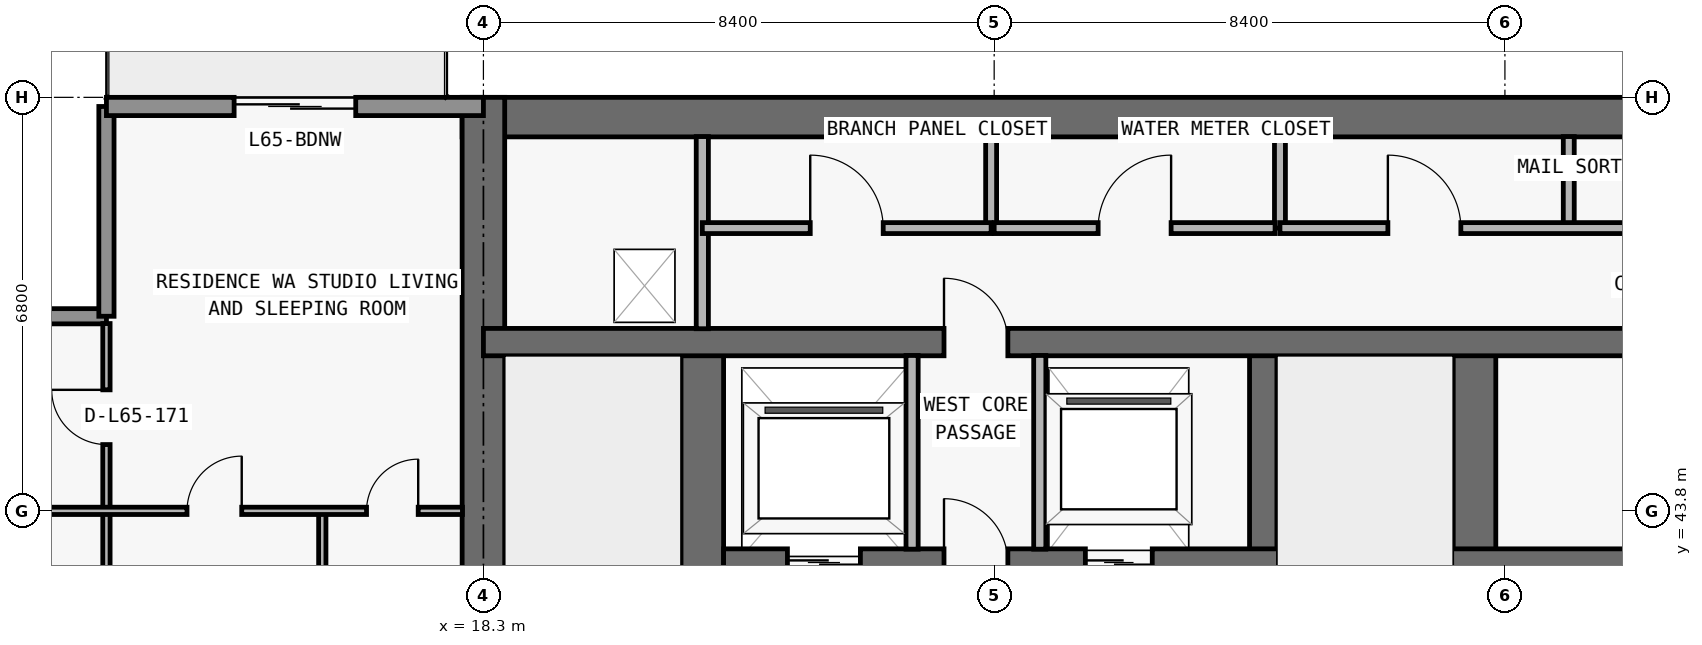
"""IFC4 building model, lengths in metres.
Left out: names, types, materials, properties, quantities, classifications, styles, units other than length and angle.
Written with IfcOpenShell. Run it as: python <this file> out.ifc"""

import sys

from ifc_helpers import new_model, si_unit, direction, frame, frame_2d, origin, place, context, subcontext, project, spatial, rectangle, extrude, element, fill, save


model = new_model("IFC4")
c1 = context("Model", 3, precision=1e-05, world=origin(), true_north=direction((0.0, 1.0)))
c2 = subcontext(c1, "Body", "Model", "MODEL_VIEW")
j1 = project(units=[si_unit("LENGTHUNIT", "METRE"), si_unit("PLANEANGLEUNIT", "RADIAN")], contexts=[c1])
p1 = place(None, origin())
s1 = spatial("IfcSite", under=j1, at=p1, CompositionType="ELEMENT")
p2 = place(p1, origin())
s2 = spatial("IfcBuilding", under=s1, at=p2, CompositionType="ELEMENT")
p3 = place(p2, frame((0.0, 0.0, 233.1)))
s3 = spatial("IfcBuildingStorey", under=s2, at=p3, CompositionType="ELEMENT", Elevation=233.1)
p4 = place(p3, frame((17.95, 50.275, 0.0), z_axis=(0.0, 0.0, 1.0), x_axis=(1.0, 0.0, 0.0)))
e1 = element("IfcWall", 1, at=p4, inside=s3, PredefinedType="SHEAR", context=c2, shape_type="SweptSolid", body=[
    extrude(rectangle(XDim=41.9, YDim=0.65, at=frame_2d((20.95, 0.0))), origin(), (0.0, 0.0, 1.0), 3.05),
])
p5 = place(p3, frame((18.3, 36.65, 0.0), z_axis=(0.0, 0.0, 1.0), x_axis=(0.0, 1.0, 0.0)))
e2 = element("IfcWall", 2, at=p5, inside=s3, PredefinedType="SHEAR", context=c2, shape_type="SweptSolid", body=[
    extrude(rectangle(XDim=13.95, YDim=0.7, at=frame_2d((6.975, 0.0))), origin(), (0.0, 0.0, 1.0), 3.05),
])
p6 = place(p3, frame((21.9, 37.0, 0.0), z_axis=(0.0, 0.0, 1.0), x_axis=(0.0, 1.0, 0.0)))
e3 = element("IfcWall", 3, at=p6, inside=s3, PredefinedType="SHEAR", context=c2, shape_type="SweptSolid", body=[
    extrude(rectangle(XDim=9.575, YDim=0.7, at=frame_2d((4.788, 0.0))), origin(), (0.0, 0.0, 1.0), 3.05),
])
p7 = place(p6, frame((0.55, 0.0, 0.0)))
e4 = element("IfcOpeningElement", 4, at=p7, cuts=e3, PredefinedType="OPENING", context=c2, shape_type="SweptSolid", body=[
    extrude(rectangle(XDim=1.1, YDim=2.15, at=frame_2d((0.55, 1.075))), frame((0.0, 0.36, 0.0), z_axis=(0.0, -1.0, 0.0), x_axis=(1.0, 0.0, 0.0)), (0.0, 0.0, 1.0), 0.72),
])
p8 = place(p3, frame((31.125, 37.0, 0.0), z_axis=(0.0, 0.0, 1.0), x_axis=(0.0, 1.0, 0.0)))
e5 = element("IfcWall", 5, at=p8, inside=s3, PredefinedType="SHEAR", context=c2, shape_type="SweptSolid", body=[
    extrude(rectangle(XDim=9.575, YDim=0.45, at=frame_2d((4.788, 0.0))), origin(), (0.0, 0.0, 1.0), 3.05),
])
p9 = place(p3, frame((34.6, 37.0, 0.0), z_axis=(0.0, 0.0, 1.0), x_axis=(0.0, 1.0, 0.0)))
e6 = element("IfcWall", 6, at=p9, inside=s3, PredefinedType="SHEAR", context=c2, shape_type="SweptSolid", body=[
    extrude(rectangle(XDim=9.575, YDim=0.7, at=frame_2d((4.788, 0.0))), origin(), (0.0, 0.0, 1.0), 3.05),
])
p10 = place(p3, frame((22.25, 42.95, 0.0), z_axis=(0.0, 0.0, 1.0), x_axis=(1.0, 0.0, 0.0)))
e7 = element("IfcWall", 7, at=p10, inside=s3, PredefinedType="SHEAR", context=c2, shape_type="SweptSolid", body=[
    extrude(rectangle(XDim=33.3, YDim=0.45, at=frame_2d((16.65, 0.0))), origin(), (0.0, 0.0, 1.0), 3.05),
])
p11 = place(p10, frame((1.05, 0.0, 0.0)))
e8 = element("IfcOpeningElement", 8, at=p11, cuts=e7, PredefinedType="OPENING", context=c2, shape_type="SweptSolid", body=[
    extrude(rectangle(XDim=1.2, YDim=2.2, at=frame_2d((0.6, 1.1))), frame((0.0, 0.235, 0.0), z_axis=(0.0, -1.0, 0.0), x_axis=(1.0, 0.0, 0.0)), (0.0, 0.0, 1.0), 0.47),
])
p12 = place(p10, frame((31.05, 0.0, 0.0)))
e9 = element("IfcOpeningElement", 9, at=p12, cuts=e7, PredefinedType="OPENING", context=c2, shape_type="SweptSolid", body=[
    extrude(rectangle(XDim=1.2, YDim=2.2, at=frame_2d((0.6, 1.1))), frame((0.0, 0.235, 0.0), z_axis=(0.0, -1.0, 0.0), x_axis=(1.0, 0.0, 0.0)), (0.0, 0.0, 1.0), 0.47),
])
p13 = place(p10, frame((26.45, 0.0, 0.0)))
e10 = element("IfcOpeningElement", 10, at=p13, cuts=e7, PredefinedType="OPENING", context=c2, shape_type="SweptSolid", body=[
    extrude(rectangle(XDim=1.1, YDim=2.2, at=frame_2d((0.55, 1.1))), frame((0.0, 0.235, 0.0), z_axis=(0.0, -1.0, 0.0), x_axis=(1.0, 0.0, 0.0)), (0.0, 0.0, 1.0), 0.47),
])
p14 = place(p10, frame((5.95, 0.0, 0.0)))
e11 = element("IfcOpeningElement", 11, at=p14, cuts=e7, PredefinedType="OPENING", context=c2, shape_type="SweptSolid", body=[
    extrude(rectangle(XDim=1.1, YDim=2.2, at=frame_2d((0.55, 1.1))), frame((0.0, 0.235, 0.0), z_axis=(0.0, -1.0, 0.0), x_axis=(1.0, 0.0, 0.0)), (0.0, 0.0, 1.0), 0.47),
])
p15 = place(p10, frame((3.625, 0.0, 0.0)))
e12 = element("IfcOpeningElement", 12, at=p15, cuts=e7, PredefinedType="OPENING", context=c2, shape_type="SweptSolid", body=[
    extrude(rectangle(XDim=1.05, YDim=2.15, at=frame_2d((0.525, 1.075))), frame((0.0, 0.235, 0.0), z_axis=(0.0, -1.0, 0.0), x_axis=(1.0, 0.0, 0.0)), (0.0, 0.0, 1.0), 0.47),
])
p16 = place(p10, frame((28.675, 0.0, 0.0)))
e13 = element("IfcOpeningElement", 13, at=p16, cuts=e7, PredefinedType="OPENING", context=c2, shape_type="SweptSolid", body=[
    extrude(rectangle(XDim=1.05, YDim=2.15, at=frame_2d((0.525, 1.075))), frame((0.0, 0.235, 0.0), z_axis=(0.0, -1.0, 0.0), x_axis=(1.0, 0.0, 0.0)), (0.0, 0.0, 1.0), 0.47),
])
p17 = place(p10, frame((15.225, 0.0, 0.0)))
e14 = element("IfcOpeningElement", 14, at=p17, cuts=e7, PredefinedType="OPENING", context=c2, shape_type="SweptSolid", body=[
    extrude(rectangle(XDim=1.0, YDim=2.2, at=frame_2d((0.5, 1.1))), frame((0.0, 0.235, 0.0), z_axis=(0.0, -1.0, 0.0), x_axis=(1.0, 0.0, 0.0)), (0.0, 0.0, 1.0), 0.47),
])
p18 = place(p10, frame((21.975, 0.0, 0.0)))
e15 = element("IfcOpeningElement", 15, at=p18, cuts=e7, PredefinedType="OPENING", context=c2, shape_type="SweptSolid", body=[
    extrude(rectangle(XDim=1.0, YDim=2.2, at=frame_2d((0.5, 1.1))), frame((0.0, 0.235, 0.0), z_axis=(0.0, -1.0, 0.0), x_axis=(1.0, 0.0, 0.0)), (0.0, 0.0, 1.0), 0.47),
])
p19 = place(p3, frame((18.3, 46.575, 0.0), z_axis=(0.0, 0.0, 1.0), x_axis=(1.0, 0.0, 0.0)))
e16 = element("IfcWall", 16, at=p19, inside=s3, PredefinedType="SHEAR", context=c2, shape_type="SweptSolid", body=[
    extrude(rectangle(XDim=41.2, YDim=0.45, at=frame_2d((20.6, 0.0))), origin(), (0.0, 0.0, 1.0), 3.05),
])
p20 = place(p19, frame((7.575, 0.0, 0.0)))
e17 = element("IfcOpeningElement", 17, at=p20, cuts=e16, PredefinedType="OPENING", context=c2, shape_type="SweptSolid", body=[
    extrude(rectangle(XDim=1.05, YDim=2.15, at=frame_2d((0.525, 1.075))), frame((0.0, 0.235, 0.0), z_axis=(0.0, -1.0, 0.0), x_axis=(1.0, 0.0, 0.0)), (0.0, 0.0, 1.0), 0.47),
])
p21 = place(p19, frame((32.625, 0.0, 0.0)))
e18 = element("IfcOpeningElement", 18, at=p21, cuts=e16, PredefinedType="OPENING", context=c2, shape_type="SweptSolid", body=[
    extrude(rectangle(XDim=1.05, YDim=2.15, at=frame_2d((0.525, 1.075))), frame((0.0, 0.235, 0.0), z_axis=(0.0, -1.0, 0.0), x_axis=(1.0, 0.0, 0.0)), (0.0, 0.0, 1.0), 0.47),
])
p22 = place(p3, frame((8.25, 47.0, 0.0), z_axis=(0.0, 0.0, 1.0), x_axis=(1.0, 0.0, 0.0)))
e19 = element("IfcWall", 19, at=p22, inside=s3, PredefinedType="ELEMENTEDWALL", context=c2, shape_type="SweptSolid", body=[
    extrude(rectangle(XDim=3.85, YDim=0.25, at=frame_2d((1.925, 0.0))), origin(), (0.0, 0.0, 1.0), 3.05),
])
p23 = place(p3, frame((12.1, 47.0, 0.0), z_axis=(0.0, 0.0, 1.0), x_axis=(0.0, 1.0, 0.0)))
e20 = element("IfcWall", 20, at=p23, inside=s3, PredefinedType="ELEMENTEDWALL", context=c2, shape_type="SweptSolid", body=[
    extrude(rectangle(XDim=3.45, YDim=0.25, at=frame_2d((1.725, 0.0))), origin(), (0.0, 0.0, 1.0), 3.05),
])
p24 = place(p3, frame((12.1, 50.45, 0.0), z_axis=(0.0, 0.0, 1.0), x_axis=(1.0, 0.0, 0.0)))
e21 = element("IfcWall", 21, at=p24, inside=s3, PredefinedType="STANDARD", context=c2, shape_type="SweptSolid", body=[
    extrude(rectangle(XDim=6.2, YDim=0.3, at=frame_2d((3.1, 0.0))), origin(), (0.0, 0.0, 1.0), 3.05),
])
p25 = place(p24, frame((2.1, 0.0, 0.0)))
e22 = element("IfcOpeningElement", 22, at=p25, cuts=e21, PredefinedType="OPENING", context=c2, shape_type="SweptSolid", body=[
    extrude(rectangle(XDim=2.0, YDim=2.3, at=frame_2d((1.0, 1.15))), frame((0.0, 0.16, 0.0), z_axis=(0.0, -1.0, 0.0), x_axis=(1.0, 0.0, 0.0)), (0.0, 0.0, 1.0), 0.32),
])
p26 = place(p3, frame((12.1, 37.005, 0.0), z_axis=(0.0, 0.0, 1.0), x_axis=(0.0, 1.0, 0.0)))
e23 = element("IfcWall", 23, at=p26, inside=s3, PredefinedType="PARTITIONING", context=c2, shape_type="SweptSolid", body=[
    extrude(rectangle(XDim=9.875, YDim=0.12, at=frame_2d((4.938, 0.0))), origin(), (0.0, 0.0, 1.0), 2.725),
])
p27 = place(p26, frame((2.948, 0.0, 0.0)))
e24 = element("IfcOpeningElement", 24, at=p27, cuts=e23, PredefinedType="OPENING", context=c2, shape_type="SweptSolid", body=[
    extrude(rectangle(XDim=0.9, YDim=2.15, at=frame_2d((0.45, 1.075))), frame((0.0, 0.07, 0.0), z_axis=(0.0, -1.0, 0.0), x_axis=(1.0, 0.0, 0.0)), (0.0, 0.0, 1.0), 0.14),
])
p28 = place(p26, frame((7.885, 0.0, 0.0)))
e25 = element("IfcOpeningElement", 25, at=p28, cuts=e23, PredefinedType="OPENING", context=c2, shape_type="SweptSolid", body=[
    extrude(rectangle(XDim=0.9, YDim=2.15, at=frame_2d((0.45, 1.075))), frame((0.0, 0.07, 0.0), z_axis=(0.0, -1.0, 0.0), x_axis=(1.0, 0.0, 0.0)), (0.0, 0.0, 1.0), 0.14),
])
p29 = place(p3, frame((15.65, 37.0, 0.0), z_axis=(0.0, 0.0, 1.0), x_axis=(0.0, 1.0, 0.0)))
e26 = element("IfcWall", 26, at=p29, inside=s3, PredefinedType="PARTITIONING", context=c2, shape_type="SweptSolid", body=[
    extrude(rectangle(XDim=6.8, YDim=0.12, at=frame_2d((3.4, 0.0))), origin(), (0.0, 0.0, 1.0), 3.05),
])
p30 = place(p29, frame((1.207, 0.0, 0.0)))
e27 = element("IfcOpeningElement", 27, at=p30, cuts=e26, PredefinedType="OPENING", context=c2, shape_type="SweptSolid", body=[
    extrude(rectangle(XDim=0.85, YDim=2.1, at=frame_2d((0.425, 1.05))), frame((0.0, 0.07, 0.0), z_axis=(0.0, -1.0, 0.0), x_axis=(1.0, 0.0, 0.0)), (0.0, 0.0, 1.0), 0.14),
])
p31 = place(p3, frame((21.9, 46.795, 0.0), z_axis=(0.0, 0.0, 1.0), x_axis=(0.0, 1.0, 0.0)))
e28 = element("IfcWall", 28, at=p31, inside=s3, PredefinedType="PARTITIONING", context=c2, shape_type="SweptSolid", body=[
    extrude(rectangle(XDim=3.16, YDim=0.2, at=frame_2d((1.58, 0.0))), origin(), (0.0, 0.0, 1.0), 3.05),
])
p32 = place(p3, frame((25.35, 43.17, 0.0), z_axis=(0.0, 0.0, 1.0), x_axis=(0.0, 1.0, 0.0)))
e29 = element("IfcWall", 29, at=p32, inside=s3, PredefinedType="PARTITIONING", context=c2, shape_type="SweptSolid", body=[
    extrude(rectangle(XDim=3.185, YDim=0.2, at=frame_2d((1.593, 0.0))), origin(), (0.0, 0.0, 1.0), 3.05),
])
p33 = place(p3, frame((26.65, 48.45, 0.0), z_axis=(0.0, 0.0, 1.0), x_axis=(0.0, 1.0, 0.0)))
e30 = element("IfcWall", 30, at=p33, inside=s3, PredefinedType="PARTITIONING", context=c2, shape_type="SweptSolid", body=[
    extrude(rectangle(XDim=1.505, YDim=0.18, at=frame_2d((0.752, 0.0))), origin(), (0.0, 0.0, 1.0), 3.05),
])
p34 = place(p3, frame((27.45, 43.17, 0.0), z_axis=(0.0, 0.0, 1.0), x_axis=(0.0, 1.0, 0.0)))
e31 = element("IfcWall", 31, at=p34, inside=s3, PredefinedType="PARTITIONING", context=c2, shape_type="SweptSolid", body=[
    extrude(rectangle(XDim=3.185, YDim=0.2, at=frame_2d((1.593, 0.0))), origin(), (0.0, 0.0, 1.0), 3.05),
])
for number, where, z_axis, x_axis in (
    (32, (31.4, 48.45, 0.0), (0.0, 0.0, 1.0), (0.0, 1.0, 0.0)),
    (33, (36.15, 48.45, 0.0), (0.0, 0.0, 1.0), (0.0, 1.0, 0.0)),
):
    element("IfcWall", number, at=place(p3, frame(where, z_axis=z_axis, x_axis=x_axis)), inside=s3, PredefinedType="PARTITIONING", context=c2, shape_type="SweptSolid", body=[
        extrude(rectangle(XDim=1.505, YDim=0.18, at=frame_2d((0.752, 0.0))), origin(), (0.0, 0.0, 1.0), 3.05),
    ])
p35 = place(p3, frame((8.395, 43.8, 0.0), z_axis=(0.0, 0.0, 1.0), x_axis=(1.0, 0.0, 0.0)))
e34 = element("IfcWall", 34, at=p35, inside=s3, PredefinedType="PARTITIONING", context=c2, shape_type="SweptSolid", body=[
    extrude(rectangle(XDim=9.56, YDim=0.12, at=frame_2d((4.78, 0.0))), origin(), (0.0, 0.0, 1.0), 2.418),
])
p36 = place(p35, frame((5.03, 0.0, 0.0)))
e35 = element("IfcOpeningElement", 35, at=p36, cuts=e34, PredefinedType="OPENING", context=c2, shape_type="SweptSolid", body=[
    extrude(rectangle(XDim=0.9, YDim=2.15, at=frame_2d((0.45, 1.075))), frame((0.0, 0.07, 0.0), z_axis=(0.0, -1.0, 0.0), x_axis=(1.0, 0.0, 0.0)), (0.0, 0.0, 1.0), 0.14),
])
p37 = place(p35, frame((7.982, 0.0, 0.0)))
e36 = element("IfcOpeningElement", 36, at=p37, cuts=e34, PredefinedType="OPENING", context=c2, shape_type="SweptSolid", body=[
    extrude(rectangle(XDim=0.85, YDim=2.1, at=frame_2d((0.425, 1.05))), frame((0.0, 0.07, 0.0), z_axis=(0.0, -1.0, 0.0), x_axis=(1.0, 0.0, 0.0)), (0.0, 0.0, 1.0), 0.14),
])
p38 = place(p3, frame((21.9, 48.45, 0.0), z_axis=(0.0, 0.0, 1.0), x_axis=(1.0, 0.0, 0.0)))
e37 = element("IfcWall", 37, at=p38, inside=s3, PredefinedType="PARTITIONING", context=c2, shape_type="SweptSolid", body=[
    extrude(rectangle(XDim=4.75, YDim=0.18, at=frame_2d((2.375, 0.0))), origin(), (0.0, 0.0, 1.0), 3.05),
])
p39 = place(p38, frame((1.775, 0.0, 0.0)))
e38 = element("IfcOpeningElement", 38, at=p39, cuts=e37, PredefinedType="OPENING", context=c2, shape_type="SweptSolid", body=[
    extrude(rectangle(XDim=1.2, YDim=2.2, at=frame_2d((0.6, 1.1))), frame((0.0, 0.1, 0.0), z_axis=(0.0, -1.0, 0.0), x_axis=(1.0, 0.0, 0.0)), (0.0, 0.0, 1.0), 0.2),
])
p40 = place(p3, frame((26.7, 48.45, 0.0), z_axis=(0.0, 0.0, 1.0), x_axis=(1.0, 0.0, 0.0)))
e39 = element("IfcWall", 39, at=p40, inside=s3, PredefinedType="PARTITIONING", context=c2, shape_type="SweptSolid", body=[
    extrude(rectangle(XDim=4.62, YDim=0.18, at=frame_2d((2.31, 0.0))), origin(), (0.0, 0.0, 1.0), 3.05),
])
p41 = place(p40, frame((1.71, 0.0, 0.0)))
e40 = element("IfcOpeningElement", 40, at=p41, cuts=e39, PredefinedType="OPENING", context=c2, shape_type="SweptSolid", body=[
    extrude(rectangle(XDim=1.2, YDim=2.2, at=frame_2d((0.6, 1.1))), frame((0.0, 0.1, 0.0), z_axis=(0.0, -1.0, 0.0), x_axis=(1.0, 0.0, 0.0)), (0.0, 0.0, 1.0), 0.2),
])
p42 = place(p3, frame((31.4, 48.45, 0.0), z_axis=(0.0, 0.0, 1.0), x_axis=(1.0, 0.0, 0.0)))
e41 = element("IfcWall", 41, at=p42, inside=s3, PredefinedType="PARTITIONING", context=c2, shape_type="SweptSolid", body=[
    extrude(rectangle(XDim=24.5, YDim=0.18, at=frame_2d((12.25, 0.0))), origin(), (0.0, 0.0, 1.0), 3.05),
])
p43 = place(p42, frame((1.775, 0.0, 0.0)))
e42 = element("IfcOpeningElement", 42, at=p43, cuts=e41, PredefinedType="OPENING", context=c2, shape_type="SweptSolid", body=[
    extrude(rectangle(XDim=1.2, YDim=2.2, at=frame_2d((0.6, 1.1))), frame((0.0, 0.1, 0.0), z_axis=(0.0, -1.0, 0.0), x_axis=(1.0, 0.0, 0.0)), (0.0, 0.0, 1.0), 0.2),
])
p44 = place(p42, frame((9.35, 0.0, 0.0)))
e43 = element("IfcOpeningElement", 43, at=p44, cuts=e41, PredefinedType="OPENING", context=c2, shape_type="SweptSolid", body=[
    extrude(rectangle(XDim=1.0, YDim=2.2, at=frame_2d((0.5, 1.1))), frame((0.0, 0.1, 0.0), z_axis=(0.0, -1.0, 0.0), x_axis=(1.0, 0.0, 0.0)), (0.0, 0.0, 1.0), 0.2),
])
p45 = place(p42, frame((16.725, 0.0, 0.0)))
e44 = element("IfcOpeningElement", 44, at=p45, cuts=e41, PredefinedType="OPENING", context=c2, shape_type="SweptSolid", body=[
    extrude(rectangle(XDim=1.2, YDim=2.2, at=frame_2d((0.6, 1.1))), frame((0.0, 0.1, 0.0), z_axis=(0.0, -1.0, 0.0), x_axis=(1.0, 0.0, 0.0)), (0.0, 0.0, 1.0), 0.2),
])
p46 = place(p42, frame((21.675, 0.0, 0.0)))
e45 = element("IfcOpeningElement", 45, at=p46, cuts=e41, PredefinedType="OPENING", context=c2, shape_type="SweptSolid", body=[
    extrude(rectangle(XDim=0.85, YDim=2.1, at=frame_2d((0.425, 1.05))), frame((0.0, 0.1, 0.0), z_axis=(0.0, -1.0, 0.0), x_axis=(1.0, 0.0, 0.0)), (0.0, 0.0, 1.0), 0.2),
])
p47 = place(p25, origin())
e46 = element("IfcDoor", 46, at=p47, inside=s3, OperationType="DOUBLE_DOOR_SLIDING", PredefinedType="DOOR", context=c2, shape_type="SweptSolid", body=[
    extrude(rectangle(XDim=2.0, YDim=2.3, at=frame_2d((1.0, 1.15))), frame((0.0, 0.025, 0.0), z_axis=(0.0, -1.0, 0.0), x_axis=(1.0, 0.0, 0.0)), (0.0, 0.0, 1.0), 0.05),
])
fill(e22, e46)
p48 = place(p11, origin())
e47 = element("IfcDoor", 47, at=p48, inside=s3, OperationType="DOUBLE_DOOR_SLIDING", PredefinedType="DOOR", context=c2, shape_type="SweptSolid", body=[
    extrude(rectangle(XDim=1.2, YDim=2.2, at=frame_2d((0.6, 1.1))), frame((0.0, 0.025, 0.0), z_axis=(0.0, -1.0, 0.0), x_axis=(1.0, 0.0, 0.0)), (0.0, 0.0, 1.0), 0.05),
])
fill(e8, e47)
p49 = place(p14, origin())
e48 = element("IfcDoor", 48, at=p49, inside=s3, OperationType="DOUBLE_DOOR_SLIDING", PredefinedType="DOOR", context=c2, shape_type="SweptSolid", body=[
    extrude(rectangle(XDim=1.1, YDim=2.2, at=frame_2d((0.55, 1.1))), frame((0.0, 0.025, 0.0), z_axis=(0.0, -1.0, 0.0), x_axis=(1.0, 0.0, 0.0)), (0.0, 0.0, 1.0), 0.05),
])
fill(e11, e48)
p50 = place(p15, origin())
e49 = element("IfcDoor", 49, at=p50, inside=s3, OperationType="SINGLE_SWING_LEFT", PredefinedType="DOOR", context=c2, shape_type="SweptSolid", body=[
    extrude(rectangle(XDim=1.05, YDim=2.15, at=frame_2d((0.525, 1.075))), frame((0.0, 0.025, 0.0), z_axis=(0.0, -1.0, 0.0), x_axis=(1.0, 0.0, 0.0)), (0.0, 0.0, 1.0), 0.05),
])
fill(e12, e49)
p51 = place(p20, origin())
e50 = element("IfcDoor", 50, at=p51, inside=s3, OperationType="SINGLE_SWING_LEFT", PredefinedType="DOOR", context=c2, shape_type="SweptSolid", body=[
    extrude(rectangle(XDim=1.05, YDim=2.15, at=frame_2d((0.525, 1.075))), frame((0.0, 0.025, 0.0), z_axis=(0.0, -1.0, 0.0), x_axis=(1.0, 0.0, 0.0)), (0.0, 0.0, 1.0), 0.05),
])
fill(e17, e50)
p52 = place(p39, origin())
e51 = element("IfcDoor", 51, at=p52, inside=s3, OperationType="SINGLE_SWING_LEFT", PredefinedType="DOOR", context=c2, shape_type="SweptSolid", body=[
    extrude(rectangle(XDim=1.2, YDim=2.2, at=frame_2d((0.6, 1.1))), frame((0.0, 0.025, 0.0), z_axis=(0.0, -1.0, 0.0), x_axis=(1.0, 0.0, 0.0)), (0.0, 0.0, 1.0), 0.05),
])
fill(e38, e51)
p53 = place(p41, origin())
e52 = element("IfcDoor", 52, at=p53, inside=s3, OperationType="SINGLE_SWING_RIGHT", PredefinedType="DOOR", context=c2, shape_type="SweptSolid", body=[
    extrude(rectangle(XDim=1.2, YDim=2.2, at=frame_2d((0.6, 1.1))), frame((0.0, 0.025, 0.0), z_axis=(0.0, -1.0, 0.0), x_axis=(1.0, 0.0, 0.0)), (0.0, 0.0, 1.0), 0.05),
])
fill(e40, e52)
p54 = place(p43, origin())
e53 = element("IfcDoor", 53, at=p54, inside=s3, OperationType="SINGLE_SWING_LEFT", PredefinedType="DOOR", context=c2, shape_type="SweptSolid", body=[
    extrude(rectangle(XDim=1.2, YDim=2.2, at=frame_2d((0.6, 1.1))), frame((0.0, 0.025, 0.0), z_axis=(0.0, -1.0, 0.0), x_axis=(1.0, 0.0, 0.0)), (0.0, 0.0, 1.0), 0.05),
])
fill(e42, e53)
p55 = place(p36, origin())
e54 = element("IfcDoor", 54, at=p55, inside=s3, OperationType="SINGLE_SWING_RIGHT", PredefinedType="DOOR", context=c2, shape_type="SweptSolid", body=[
    extrude(rectangle(XDim=0.9, YDim=2.15, at=frame_2d((0.45, 1.075))), frame((0.0, 0.025, 0.0), z_axis=(0.0, -1.0, 0.0), x_axis=(1.0, 0.0, 0.0)), (0.0, 0.0, 1.0), 0.05),
])
fill(e35, e54)
p56 = place(p37, origin())
e55 = element("IfcDoor", 55, at=p56, inside=s3, OperationType="SINGLE_SWING_RIGHT", PredefinedType="DOOR", context=c2, shape_type="SweptSolid", body=[
    extrude(rectangle(XDim=0.85, YDim=2.1, at=frame_2d((0.425, 1.05))), frame((0.0, 0.025, 0.0), z_axis=(0.0, -1.0, 0.0), x_axis=(1.0, 0.0, 0.0)), (0.0, 0.0, 1.0), 0.05),
])
fill(e36, e55)
p57 = place(p28, origin())
e56 = element("IfcDoor", 56, at=p57, inside=s3, OperationType="SINGLE_SWING_RIGHT", PredefinedType="DOOR", context=c2, shape_type="SweptSolid", body=[
    extrude(rectangle(XDim=0.9, YDim=2.15, at=frame_2d((0.45, 1.075))), frame((0.0, 0.025, 0.0), z_axis=(0.0, -1.0, 0.0), x_axis=(1.0, 0.0, 0.0)), (0.0, 0.0, 1.0), 0.05),
])
fill(e25, e56)
save(model, sys.argv[1])
